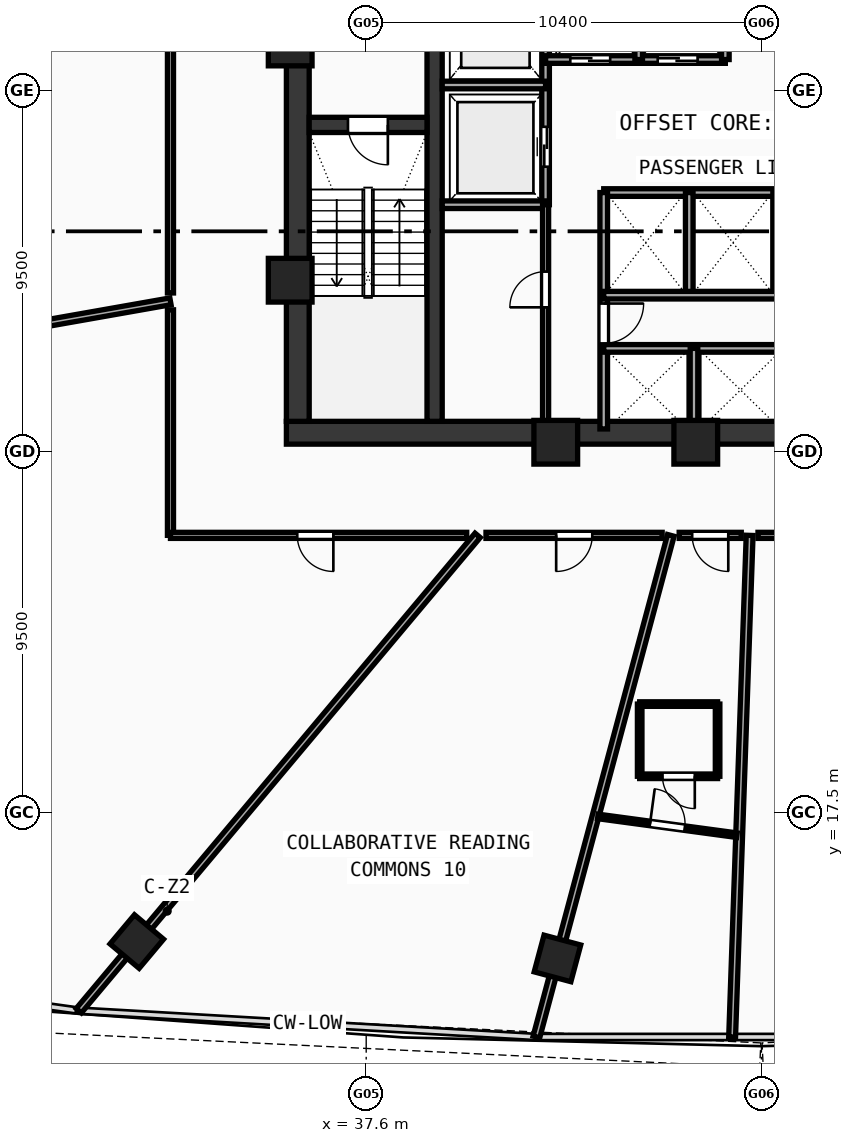
"""IFC4 building model, lengths in metres.
Left out: names, types, materials, properties, quantities, classifications, styles, units other than length and angle.
Written with IfcOpenShell. Run it as: python <this file> out.ifc"""

import sys

from ifc_helpers import new_model, si_unit, direction, frame, frame_2d, origin, origin_with_axes, origin_2d, place, context, subcontext, project, spatial, rectangle, hollow_rectangle, extrude, source, transform, mapped, element, fill, save


model = new_model("IFC4")
c1 = context("Model", 3, precision=1e-05, world=origin(), true_north=direction((0.0, 1.0)))
c2 = subcontext(c1, "Body", "Model", "MODEL_VIEW")
j1 = project(units=[si_unit("LENGTHUNIT", "METRE"), si_unit("PLANEANGLEUNIT", "RADIAN")], contexts=[c1])
p1 = place(None, origin())
s1 = spatial("IfcSite", under=j1, at=p1, CompositionType="ELEMENT")
p2 = place(p1, origin())
s2 = spatial("IfcBuilding", under=s1, at=p2, CompositionType="ELEMENT")
p3 = place(p2, frame((0.0, 0.0, 88.78)))
s3 = spatial("IfcBuildingStorey", under=s2, at=p3, CompositionType="ELEMENT", Elevation=88.78)
p4 = place(p3, frame((35.5, 27.5, 0.0), z_axis=(0.0, 0.0, 1.0), x_axis=(1.0, 0.0, 0.0)))
e1 = element("IfcWall", 1, at=p4, inside=s3, PredefinedType="SHEAR", context=c2, shape_type="SweptSolid", body=[
    extrude(rectangle(XDim=25.0, YDim=0.6, at=frame_2d((12.5, 0.0))), origin(), (0.0, 0.0, 1.0), 3.54),
])
p5 = place(p3, frame((35.8, 27.8, 0.0), z_axis=(0.0, 0.0, 1.0), x_axis=(0.0, 1.0, 0.0)))
e2 = element("IfcWall", 2, at=p5, inside=s3, PredefinedType="SHEAR", context=c2, shape_type="SweptSolid", body=[
    extrude(rectangle(XDim=12.1, YDim=0.6, at=frame_2d((6.05, 0.0))), origin(), (0.0, 0.0, 1.0), 3.54),
])
p6 = place(p3, frame((39.4, 27.8, 0.0), z_axis=(0.0, 0.0, 1.0), x_axis=(0.0, 1.0, 0.0)))
e3 = element("IfcWall", 3, at=p6, inside=s3, PredefinedType="SHEAR", context=c2, shape_type="SweptSolid", body=[
    extrude(rectangle(XDim=12.1, YDim=0.4, at=frame_2d((6.05, 0.0))), origin(), (0.0, 0.0, 1.0), 3.54),
])
p7 = place(p6, frame((9.95, 0.0, 0.0)))
e4 = element("IfcOpeningElement", 4, at=p7, cuts=e3, PredefinedType="OPENING", context=c2, shape_type="SweptSolid", body=[
    extrude(rectangle(XDim=1.1, YDim=2.1, at=frame_2d((0.55, 1.05))), frame((0.0, 0.21, 0.0), z_axis=(0.0, -1.0, 0.0), x_axis=(1.0, 0.0, 0.0)), (0.0, 0.0, 1.0), 0.42),
])
p8 = place(p3, frame((36.1, 35.6, 0.0), z_axis=(0.0, 0.0, 1.0), x_axis=(1.0, 0.0, 0.0)))
e5 = element("IfcWall", 5, at=p8, inside=s3, PredefinedType="SHEAR", context=c2, shape_type="SweptSolid", body=[
    extrude(rectangle(XDim=3.1, YDim=0.4, at=frame_2d((1.55, 0.0))), origin(), (0.0, 0.0, 1.0), 3.54),
])
p9 = place(p8, frame((1.02, 0.0, 0.0)))
e6 = element("IfcOpeningElement", 6, at=p9, cuts=e5, PredefinedType="OPENING", context=c2, shape_type="SweptSolid", body=[
    extrude(rectangle(XDim=1.05, YDim=2.1, at=frame_2d((0.525, 1.05))), frame((0.0, 0.21, 0.0), z_axis=(0.0, -1.0, 0.0), x_axis=(1.0, 0.0, 0.0)), (0.0, 0.0, 1.0), 0.42),
])
m1 = source(origin(), c2, "Body", "SweptSolid", [
    extrude(hollow_rectangle(XDim=1.15, YDim=1.15, WallThickness=0.048, at=origin_2d()), origin(), (0.0, 0.0, 1.0), 3.8),
])
for number, where, z_axis, x_axis in (
    (7, (42.588, 27.25, -0.26), (0.0, 0.0, 1.0), (1.0, 0.0, 0.0)),
    (8, (46.272, 27.25, -0.26), (0.0, 0.0, 1.0), (1.0, 0.0, 0.0)),
    (9, (35.6, 37.729, -0.26), (0.0, 0.0, 1.0), (1.0, 0.0, 0.0)),
    (10, (35.6, 31.513, -0.26), (0.0, 0.0, 1.0), (1.0, 0.0, 0.0)),
):
    element("IfcColumn", number, at=place(p3, frame(where, z_axis=z_axis, x_axis=x_axis)), inside=s3, PredefinedType="COLUMN", context=c2, shape_type="MappedRepresentation", body=[
        mapped(m1, transform((0.0, 0.0, 0.0), scale=1.0)),
    ])
m2 = source(origin(), c2, "Body", "SweptSolid", [
    extrude(hollow_rectangle(XDim=1.0, YDim=1.0, WallThickness=0.042, at=origin_2d()), origin(), (0.0, 0.0, 1.0), 3.8),
])
for number, where, z_axis, x_axis in (
    (11, (31.564, 14.112, -0.26), (0.0, 0.0, 1.0), (0.766, -0.643, 0.0)),
    (12, (42.633, 13.668, -0.26), (0.0, 0.0, 1.0), (0.966, -0.259, 0.0)),
):
    element("IfcColumn", number, at=place(p3, frame(where, z_axis=z_axis, x_axis=x_axis)), inside=s3, PredefinedType="COLUMN", context=c2, shape_type="MappedRepresentation", body=[
        mapped(m2, transform((0.0, 0.0, 0.0), scale=1.0)),
    ])
p10 = place(p3, frame((42.32, 33.5, 0.0), z_axis=(0.0, 0.0, 1.0), x_axis=(0.0, 1.0, 0.0)))
e13 = element("IfcWall", 13, at=p10, inside=s3, PredefinedType="SOLIDWALL", context=c2, shape_type="SweptSolid", body=[
    extrude(rectangle(XDim=6.45, YDim=0.2, at=frame_2d((3.225, 0.0))), origin(), (0.0, 0.0, 1.0), 3.54),
])
p11 = place(p10, frame((1.0, 0.0, 0.0)))
e14 = element("IfcOpeningElement", 14, at=p11, cuts=e13, PredefinedType="OPENING", context=c2, shape_type="SweptSolid", body=[
    extrude(rectangle(XDim=1.05, YDim=2.1, at=frame_2d((0.525, 1.05))), frame((0.0, 0.11, 0.0), z_axis=(0.0, -1.0, 0.0), x_axis=(1.0, 0.0, 0.0)), (0.0, 0.0, 1.0), 0.22),
])
for number, where, z_axis, x_axis in (
    (15, (39.6, 36.65, 0.0), (0.0, 0.0, 1.0), (1.0, 0.0, 0.0)),
    (16, (39.6, 33.5, 0.0), (0.0, 0.0, 1.0), (1.0, 0.0, 0.0)),
):
    element("IfcWall", number, at=place(p3, frame(where, z_axis=z_axis, x_axis=x_axis)), inside=s3, PredefinedType="SOLIDWALL", context=c2, shape_type="SweptSolid", body=[
        extrude(rectangle(XDim=2.72, YDim=0.2, at=frame_2d((1.36, 0.0))), origin(), (0.0, 0.0, 1.0), 3.54),
    ])
p12 = place(p3, frame((42.32, 37.32, 0.0), z_axis=(0.0, 0.0, 1.0), x_axis=(1.0, 0.0, 0.0)))
e17 = element("IfcWall", 17, at=p12, inside=s3, PredefinedType="SOLIDWALL", context=c2, shape_type="SweptSolid", body=[
    extrude(rectangle(XDim=4.73, YDim=0.2, at=frame_2d((2.365, 0.0))), origin(), (0.0, 0.0, 1.0), 3.54),
])
p13 = place(p12, frame((0.65, 0.0, 0.0)))
e18 = element("IfcOpeningElement", 18, at=p13, cuts=e17, PredefinedType="OPENING", context=c2, shape_type="SweptSolid", body=[
    extrude(rectangle(XDim=1.05, YDim=2.1, at=frame_2d((0.525, 1.05))), frame((0.0, 0.11, 0.0), z_axis=(0.0, -1.0, 0.0), x_axis=(1.0, 0.0, 0.0)), (0.0, 0.0, 1.0), 0.22),
])
p14 = place(p12, frame((2.95, 0.0, 0.0)))
e19 = element("IfcOpeningElement", 19, at=p14, cuts=e17, PredefinedType="OPENING", context=c2, shape_type="SweptSolid", body=[
    extrude(rectangle(XDim=1.05, YDim=2.1, at=frame_2d((0.525, 1.05))), frame((0.0, 0.11, 0.0), z_axis=(0.0, -1.0, 0.0), x_axis=(1.0, 0.0, 0.0)), (0.0, 0.0, 1.0), 0.22),
])
for number, where, z_axis, x_axis in (
    (20, (47.05, 37.32, 0.0), (0.0, 0.0, 1.0), (0.0, 1.0, 0.0)),
    (21, (44.77, 37.32, 0.0), (0.0, 0.0, 1.0), (0.0, 1.0, 0.0)),
):
    element("IfcWall", number, at=place(p3, frame(where, z_axis=z_axis, x_axis=x_axis)), inside=s3, PredefinedType="SOLIDWALL", context=c2, shape_type="SweptSolid", body=[
        extrude(rectangle(XDim=2.63, YDim=0.2, at=frame_2d((1.315, 0.0))), origin(), (0.0, 0.0, 1.0), 3.54),
    ])
p15 = place(p3, frame((43.85, 33.82, 0.0), z_axis=(0.0, 0.0, 1.0), x_axis=(1.0, 0.0, 0.0)))
e22 = element("IfcWall", 22, at=p15, inside=s3, PredefinedType="SOLIDWALL", context=c2, shape_type="SweptSolid", body=[
    extrude(rectangle(XDim=9.83, YDim=0.2, at=frame_2d((4.915, 0.0))), origin(), (0.0, 0.0, 1.0), 3.54),
])
p16 = place(p3, frame((43.85, 27.6, 0.0), z_axis=(0.0, 0.0, 1.0), x_axis=(0.0, 1.0, 0.0)))
e23 = element("IfcWall", 23, at=p16, inside=s3, PredefinedType="SOLIDWALL", context=c2, shape_type="SweptSolid", body=[
    extrude(rectangle(XDim=6.22, YDim=0.2, at=frame_2d((3.11, 0.0))), origin(), (0.0, 0.0, 1.0), 3.54),
])
p17 = place(p16, frame((2.25, 0.0, 0.0)))
e24 = element("IfcOpeningElement", 24, at=p17, cuts=e23, PredefinedType="OPENING", context=c2, shape_type="SweptSolid", body=[
    extrude(rectangle(XDim=1.05, YDim=2.1, at=frame_2d((0.525, 1.05))), frame((0.0, 0.11, 0.0), z_axis=(0.0, -1.0, 0.0), x_axis=(1.0, 0.0, 0.0)), (0.0, 0.0, 1.0), 0.22),
])
for number, where, z_axis, x_axis in (
    (25, (46.1, 31.12, 0.0), (0.0, 0.0, 1.0), (0.0, 1.0, 0.0)),
    (26, (48.4, 31.12, 0.0), (0.0, 0.0, 1.0), (0.0, 1.0, 0.0)),
):
    element("IfcWall", number, at=place(p3, frame(where, z_axis=z_axis, x_axis=x_axis)), inside=s3, PredefinedType="SOLIDWALL", context=c2, shape_type="SweptSolid", body=[
        extrude(rectangle(XDim=2.7, YDim=0.2, at=frame_2d((1.35, 0.0))), origin(), (0.0, 0.0, 1.0), 3.54),
    ])
p18 = place(p3, frame((43.85, 29.72, 0.0), z_axis=(0.0, 0.0, 1.0), x_axis=(1.0, 0.0, 0.0)))
e27 = element("IfcWall", 27, at=p18, inside=s3, PredefinedType="SOLIDWALL", context=c2, shape_type="SweptSolid", body=[
    extrude(rectangle(XDim=7.2, YDim=0.2, at=frame_2d((3.6, 0.0))), origin(), (0.0, 0.0, 1.0), 3.54),
])
p19 = place(p3, frame((43.85, 31.12, 0.0), z_axis=(0.0, 0.0, 1.0), x_axis=(1.0, 0.0, 0.0)))
e28 = element("IfcWall", 28, at=p19, inside=s3, PredefinedType="SOLIDWALL", context=c2, shape_type="SweptSolid", body=[
    extrude(rectangle(XDim=9.83, YDim=0.2, at=frame_2d((4.915, 0.0))), origin(), (0.0, 0.0, 1.0), 3.54),
])
p20 = place(p3, frame((46.225, 27.6, 0.0), z_axis=(0.0, 0.0, 1.0), x_axis=(0.0, 1.0, 0.0)))
e29 = element("IfcWall", 29, at=p20, inside=s3, PredefinedType="SOLIDWALL", context=c2, shape_type="SweptSolid", body=[
    extrude(rectangle(XDim=2.12, YDim=0.2, at=frame_2d((1.06, 0.0))), origin(), (0.0, 0.0, 1.0), 3.54),
])
p21 = place(p3, frame((42.32, 27.6, 0.0), z_axis=(0.0, 0.0, 1.0), x_axis=(0.0, 1.0, 0.0)))
e30 = element("IfcWall", 30, at=p21, inside=s3, PredefinedType="PARTITIONING", context=c2, shape_type="SweptSolid", body=[
    extrude(rectangle(XDim=5.9, YDim=0.16, at=frame_2d((2.95, 0.0))), origin(), (0.0, 0.0, 1.0), 3.54),
])
p22 = place(p21, frame((3.2, 0.0, 0.0)))
e31 = element("IfcOpeningElement", 31, at=p22, cuts=e30, PredefinedType="OPENING", context=c2, shape_type="SweptSolid", body=[
    extrude(rectangle(XDim=0.94, YDim=2.1, at=frame_2d((0.47, 1.05))), frame((0.0, 0.09, 0.0), z_axis=(0.0, -1.0, 0.0), x_axis=(1.0, 0.0, 0.0)), (0.0, 0.0, 1.0), 0.18),
])
p23 = place(p3, frame((32.45, 30.958, 0.0), z_axis=(0.0, 0.0, 1.0), x_axis=(-0.984808048641, -0.173646501066, 0.0)))
e32 = element("IfcWall", 32, at=p23, inside=s3, PredefinedType="PARTITIONING", context=c2, shape_type="SweptSolid", body=[
    extrude(rectangle(XDim=25.582, YDim=0.18, at=frame_2d((12.791, 0.0))), origin(), (0.0, 0.0, 1.0), 2.84),
])
p24 = place(p3, frame((40.532, 24.8, 0.0), z_axis=(0.0, 0.0, 1.0), x_axis=(-0.642790086939, -0.76604236445, 0.0)))
e33 = element("IfcWall", 33, at=p24, inside=s3, PredefinedType="PARTITIONING", context=c2, shape_type="SweptSolid", body=[
    extrude(rectangle(XDim=16.326, YDim=0.18, at=frame_2d((8.163, 0.0))), origin(), (0.0, 0.0, 1.0), 2.84),
])
p25 = place(p3, frame((45.615, 24.8, 0.0), z_axis=(0.0, 0.0, 1.0), x_axis=(-0.25881675816, -0.965926439071, 0.0)))
e34 = element("IfcWall", 34, at=p25, inside=s3, PredefinedType="PARTITIONING", context=c2, shape_type="SweptSolid", body=[
    extrude(rectangle(XDim=13.665, YDim=0.18, at=frame_2d((6.832, 0.0))), origin(), (0.0, 0.0, 1.0), 2.84),
])
p26 = place(p3, frame((47.689, 24.8, 0.0), z_axis=(0.0, 0.0, 1.0), x_axis=(-0.034900944933, -0.999390776445, 0.0)))
e35 = element("IfcWall", 35, at=p26, inside=s3, PredefinedType="PARTITIONING", context=c2, shape_type="SweptSolid", body=[
    extrude(rectangle(XDim=13.207, YDim=0.18, at=frame_2d((6.604, 0.0))), origin(), (0.0, 0.0, 1.0), 2.84),
])
p27 = place(p3, frame((32.45, 24.8, 0.0), z_axis=(0.0, 0.0, 1.0), x_axis=(0.0, 1.0, 0.0)))
e36 = element("IfcWall", 36, at=p27, inside=s3, PredefinedType="PARTITIONING", context=c2, shape_type="SweptSolid", body=[
    extrude(rectangle(XDim=5.935, YDim=0.16, at=frame_2d((2.967, 0.0))), origin(), (0.0, 0.0, 1.0), 3.14),
])
p28 = place(p3, frame((32.45, 31.178, 0.0), z_axis=(0.0, 0.0, 1.0), x_axis=(0.0, 1.0, 0.0)))
e37 = element("IfcWall", 37, at=p28, inside=s3, PredefinedType="PARTITIONING", context=c2, shape_type="SweptSolid", body=[
    extrude(rectangle(XDim=16.304, YDim=0.16, at=frame_2d((8.152, 0.0))), origin(), (0.0, 0.0, 1.0), 2.84),
])
p29 = place(p28, frame((7.677, 0.0, 0.0)))
e38 = element("IfcOpeningElement", 38, at=p29, cuts=e37, PredefinedType="OPENING", context=c2, shape_type="SweptSolid", body=[
    extrude(rectangle(XDim=0.95, YDim=2.1, at=frame_2d((0.475, 1.05))), frame((0.0, 0.09, 0.0), z_axis=(0.0, -1.0, 0.0), x_axis=(1.0, 0.0, 0.0)), (0.0, 0.0, 1.0), 0.18),
])
p30 = place(p3, frame((50.165, 24.8, 0.0), z_axis=(0.0, 0.0, 1.0), x_axis=(-1.0, 0.0, 0.0)))
e39 = element("IfcWall", 39, at=p30, inside=s3, PredefinedType="PARTITIONING", context=c2, shape_type="SweptSolid", body=[
    extrude(rectangle(XDim=2.256, YDim=0.16, at=frame_2d((1.128, 0.0))), origin(), (0.0, 0.0, 1.0), 3.54),
])
p31 = place(p30, frame((0.653, 0.0, 0.0)))
e40 = element("IfcOpeningElement", 40, at=p31, cuts=e39, PredefinedType="OPENING", context=c2, shape_type="SweptSolid", body=[
    extrude(rectangle(XDim=0.95, YDim=2.1, at=frame_2d((0.475, 1.05))), frame((0.0, 0.09, 0.0), z_axis=(0.0, -1.0, 0.0), x_axis=(1.0, 0.0, 0.0)), (0.0, 0.0, 1.0), 0.18),
])
p32 = place(p3, frame((47.469, 24.8, 0.0), z_axis=(0.0, 0.0, 1.0), x_axis=(-1.0, 0.0, 0.0)))
e41 = element("IfcWall", 41, at=p32, inside=s3, PredefinedType="PARTITIONING", context=c2, shape_type="SweptSolid", body=[
    extrude(rectangle(XDim=1.634, YDim=0.16, at=frame_2d((0.817, 0.0))), origin(), (0.0, 0.0, 1.0), 3.54),
])
p33 = place(p32, frame((0.342, 0.0, 0.0)))
e42 = element("IfcOpeningElement", 42, at=p33, cuts=e41, PredefinedType="OPENING", context=c2, shape_type="SweptSolid", body=[
    extrude(rectangle(XDim=0.95, YDim=2.1, at=frame_2d((0.475, 1.05))), frame((0.0, 0.09, 0.0), z_axis=(0.0, -1.0, 0.0), x_axis=(1.0, 0.0, 0.0)), (0.0, 0.0, 1.0), 0.18),
])
p34 = place(p3, frame((45.387, 24.8, 0.0), z_axis=(0.0, 0.0, 1.0), x_axis=(-1.0, 0.0, 0.0)))
e43 = element("IfcWall", 43, at=p34, inside=s3, PredefinedType="PARTITIONING", context=c2, shape_type="SweptSolid", body=[
    extrude(rectangle(XDim=4.635, YDim=0.16, at=frame_2d((2.318, 0.0))), origin(), (0.0, 0.0, 1.0), 2.84),
])
p35 = place(p34, frame((1.839, 0.0, 0.0)))
e44 = element("IfcOpeningElement", 44, at=p35, cuts=e43, PredefinedType="OPENING", context=c2, shape_type="SweptSolid", body=[
    extrude(rectangle(XDim=0.95, YDim=2.1, at=frame_2d((0.475, 1.05))), frame((0.0, 0.09, 0.0), z_axis=(0.0, -1.0, 0.0), x_axis=(1.0, 0.0, 0.0)), (0.0, 0.0, 1.0), 0.18),
])
p36 = place(p3, frame((40.245, 24.8, 0.0), z_axis=(0.0, 0.0, 1.0), x_axis=(-1.0, 0.0, 0.0)))
e45 = element("IfcWall", 45, at=p36, inside=s3, PredefinedType="PARTITIONING", context=c2, shape_type="SweptSolid", body=[
    extrude(rectangle(XDim=7.795, YDim=0.16, at=frame_2d((3.897, 0.0))), origin(), (0.0, 0.0, 1.0), 3.14),
])
p37 = place(p36, frame((3.509, 0.0, 0.0)))
e46 = element("IfcOpeningElement", 46, at=p37, cuts=e45, PredefinedType="OPENING", context=c2, shape_type="SweptSolid", body=[
    extrude(rectangle(XDim=0.95, YDim=2.1, at=frame_2d((0.475, 1.05))), frame((0.0, 0.09, 0.0), z_axis=(0.0, -1.0, 0.0), x_axis=(1.0, 0.0, 0.0)), (0.0, 0.0, 1.0), 0.18),
])
p38 = place(p3, frame((44.796, 18.461, 0.0), z_axis=(0.0, 0.0, 1.0), x_axis=(1.0, 0.0, 0.0)))
e47 = element("IfcWall", 47, at=p38, inside=s3, PredefinedType="PARTITIONING", context=c2, shape_type="SweptSolid", body=[
    extrude(rectangle(XDim=2.05, YDim=0.12, at=frame_2d((1.025, 0.0))), origin(), (0.0, 0.0, 1.0), 3.54),
])
p39 = place(p38, frame((0.6, 0.0, 0.0)))
e48 = element("IfcOpeningElement", 48, at=p39, cuts=e47, PredefinedType="OPENING", context=c2, shape_type="SweptSolid", body=[
    extrude(rectangle(XDim=0.85, YDim=2.1, at=frame_2d((0.425, 1.05))), frame((0.0, 0.07, 0.0), z_axis=(0.0, -1.0, 0.0), x_axis=(1.0, 0.0, 0.0)), (0.0, 0.0, 1.0), 0.14),
])
p40 = place(p3, frame((46.846, 18.461, 0.0), z_axis=(0.0, 0.0, 1.0), x_axis=(0.0, 1.0, 0.0)))
e49 = element("IfcWall", 49, at=p40, inside=s3, PredefinedType="PARTITIONING", context=c2, shape_type="SweptSolid", body=[
    extrude(rectangle(XDim=1.9, YDim=0.12, at=frame_2d((0.95, 0.0))), origin(), (0.0, 0.0, 1.0), 3.54),
])
p41 = place(p3, frame((46.846, 20.361, 0.0), z_axis=(0.0, 0.0, 1.0), x_axis=(-1.0, 0.0, 0.0)))
e50 = element("IfcWall", 50, at=p41, inside=s3, PredefinedType="PARTITIONING", context=c2, shape_type="SweptSolid", body=[
    extrude(rectangle(XDim=2.05, YDim=0.12, at=frame_2d((1.025, 0.0))), origin(), (0.0, 0.0, 1.0), 3.54),
])
p42 = place(p3, frame((44.796, 20.361, 0.0), z_axis=(0.0, 0.0, 1.0), x_axis=(0.0, -1.0, 0.0)))
e51 = element("IfcWall", 51, at=p42, inside=s3, PredefinedType="PARTITIONING", context=c2, shape_type="SweptSolid", body=[
    extrude(rectangle(XDim=1.9, YDim=0.12, at=frame_2d((0.95, 0.0))), origin(), (0.0, 0.0, 1.0), 3.54),
])
p43 = place(p3, frame((43.696, 17.405, 0.0), z_axis=(0.0, 0.0, 1.0), x_axis=(0.99099005791, -0.133935451329, 0.0)))
e52 = element("IfcWall", 52, at=p43, inside=s3, PredefinedType="PARTITIONING", context=c2, shape_type="SweptSolid", body=[
    extrude(rectangle(XDim=3.691, YDim=0.12, at=frame_2d((1.846, 0.0))), origin(), (0.0, 0.0, 1.0), 2.84),
])
p44 = place(p43, frame((1.385, 0.0, 0.0)))
e53 = element("IfcOpeningElement", 53, at=p44, cuts=e52, PredefinedType="OPENING", context=c2, shape_type="SweptSolid", body=[
    extrude(rectangle(XDim=0.92, YDim=2.1, at=frame_2d((0.46, 1.05))), frame((0.0, 0.07, 0.0), z_axis=(0.0, -1.0, 0.0), x_axis=(1.0, 0.0, 0.0)), (0.0, 0.0, 1.0), 0.14),
])
m3 = source(origin(), c2, "Body", "SweptSolid", [
    extrude(rectangle(XDim=1.05, YDim=2.1, at=frame_2d((0.525, 1.05))), frame((0.0, 0.025, 0.0), z_axis=(0.0, -1.0, 0.0), x_axis=(1.0, 0.0, 0.0)), (0.0, 0.0, 1.0), 0.05),
])
p45 = place(p9, frame((1.05, 0.0, 0.0), z_axis=(0.0, 0.0, 1.0), x_axis=(-1.0, 0.0, 0.0)))
e54 = element("IfcDoor", 54, at=p45, inside=s3, OperationType="SINGLE_SWING_LEFT", PredefinedType="DOOR", context=c2, shape_type="MappedRepresentation", body=[
    mapped(m3, transform((0.0, 0.0, 0.0), scale=1.0)),
])
fill(e6, e54)
p46 = place(p11, origin_with_axes())
e55 = element("IfcDoor", 55, at=p46, inside=s3, OperationType="DOUBLE_DOOR_SLIDING", PredefinedType="DOOR", context=c2, shape_type="MappedRepresentation", body=[
    mapped(m3, transform((0.0, 0.0, 0.0), scale=1.0)),
])
fill(e14, e55)
p47 = place(p13, frame((1.05, 0.0, 0.0), z_axis=(0.0, 0.0, 1.0), x_axis=(-1.0, 0.0, 0.0)))
e56 = element("IfcDoor", 56, at=p47, inside=s3, OperationType="DOUBLE_DOOR_SLIDING", PredefinedType="DOOR", context=c2, shape_type="MappedRepresentation", body=[
    mapped(m3, transform((0.0, 0.0, 0.0), scale=1.0)),
])
fill(e18, e56)
p48 = place(p14, frame((1.05, 0.0, 0.0), z_axis=(0.0, 0.0, 1.0), x_axis=(-1.0, 0.0, 0.0)))
e57 = element("IfcDoor", 57, at=p48, inside=s3, OperationType="DOUBLE_DOOR_SLIDING", PredefinedType="DOOR", context=c2, shape_type="MappedRepresentation", body=[
    mapped(m3, transform((0.0, 0.0, 0.0), scale=1.0)),
])
fill(e19, e57)
p49 = place(p17, frame((1.05, 0.0, 0.0), z_axis=(0.0, 0.0, 1.0), x_axis=(-1.0, 0.0, 0.0)))
e58 = element("IfcDoor", 58, at=p49, inside=s3, OperationType="SINGLE_SWING_LEFT", PredefinedType="DOOR", context=c2, shape_type="MappedRepresentation", body=[
    mapped(m3, transform((0.0, 0.0, 0.0), scale=1.0)),
])
fill(e24, e58)
m4 = source(origin(), c2, "Body", "SweptSolid", [
    extrude(rectangle(XDim=0.94, YDim=2.1, at=frame_2d((0.47, 1.05))), frame((0.0, 0.025, 0.0), z_axis=(0.0, -1.0, 0.0), x_axis=(1.0, 0.0, 0.0)), (0.0, 0.0, 1.0), 0.05),
])
p50 = place(p22, origin_with_axes())
e59 = element("IfcDoor", 59, at=p50, inside=s3, OperationType="SINGLE_SWING_LEFT", PredefinedType="DOOR", context=c2, shape_type="MappedRepresentation", body=[
    mapped(m4, transform((0.0, 0.0, 0.0), scale=1.0)),
])
fill(e31, e59)
m5 = source(origin(), c2, "Body", "SweptSolid", [
    extrude(rectangle(XDim=0.95, YDim=2.1, at=frame_2d((0.475, 1.05))), frame((0.0, 0.025, 0.0), z_axis=(0.0, -1.0, 0.0), x_axis=(1.0, 0.0, 0.0)), (0.0, 0.0, 1.0), 0.05),
])
p51 = place(p37, origin_with_axes())
e60 = element("IfcDoor", 60, at=p51, inside=s3, OperationType="SINGLE_SWING_LEFT", PredefinedType="DOOR", context=c2, shape_type="MappedRepresentation", body=[
    mapped(m5, transform((0.0, 0.0, 0.0), scale=1.0)),
])
fill(e46, e60)
p52 = place(p35, origin_with_axes())
e61 = element("IfcDoor", 61, at=p52, inside=s3, OperationType="SINGLE_SWING_RIGHT", PredefinedType="DOOR", context=c2, shape_type="MappedRepresentation", body=[
    mapped(m5, transform((0.0, 0.0, 0.0), scale=1.0)),
])
fill(e44, e61)
p53 = place(p33, origin_with_axes())
e62 = element("IfcDoor", 62, at=p53, inside=s3, OperationType="SINGLE_SWING_LEFT", PredefinedType="DOOR", context=c2, shape_type="MappedRepresentation", body=[
    mapped(m5, transform((0.0, 0.0, 0.0), scale=1.0)),
])
fill(e42, e62)
m6 = source(origin(), c2, "Body", "SweptSolid", [
    extrude(rectangle(XDim=0.85, YDim=2.1, at=frame_2d((0.425, 1.05))), frame((0.0, 0.025, 0.0), z_axis=(0.0, -1.0, 0.0), x_axis=(1.0, 0.0, 0.0)), (0.0, 0.0, 1.0), 0.05),
])
p54 = place(p39, frame((0.85, 0.0, 0.0), z_axis=(0.0, 0.0, 1.0), x_axis=(-1.0, 0.0, 0.0)))
e63 = element("IfcDoor", 63, at=p54, inside=s3, OperationType="SINGLE_SWING_LEFT", PredefinedType="DOOR", context=c2, shape_type="MappedRepresentation", body=[
    mapped(m6, transform((0.0, 0.0, 0.0), scale=1.0)),
])
fill(e48, e63)
m7 = source(origin(), c2, "Body", "SweptSolid", [
    extrude(rectangle(XDim=0.92, YDim=2.1, at=frame_2d((0.46, 1.05))), frame((0.0, 0.025, 0.0), z_axis=(0.0, -1.0, 0.0), x_axis=(1.0, 0.0, 0.0)), (0.0, 0.0, 1.0), 0.05),
])
p55 = place(p44, origin_with_axes())
e64 = element("IfcDoor", 64, at=p55, inside=s3, OperationType="SINGLE_SWING_LEFT", PredefinedType="DOOR", context=c2, shape_type="MappedRepresentation", body=[
    mapped(m7, transform((0.0, 0.0, 0.0), scale=1.0)),
])
fill(e53, e64)
save(model, sys.argv[1])
